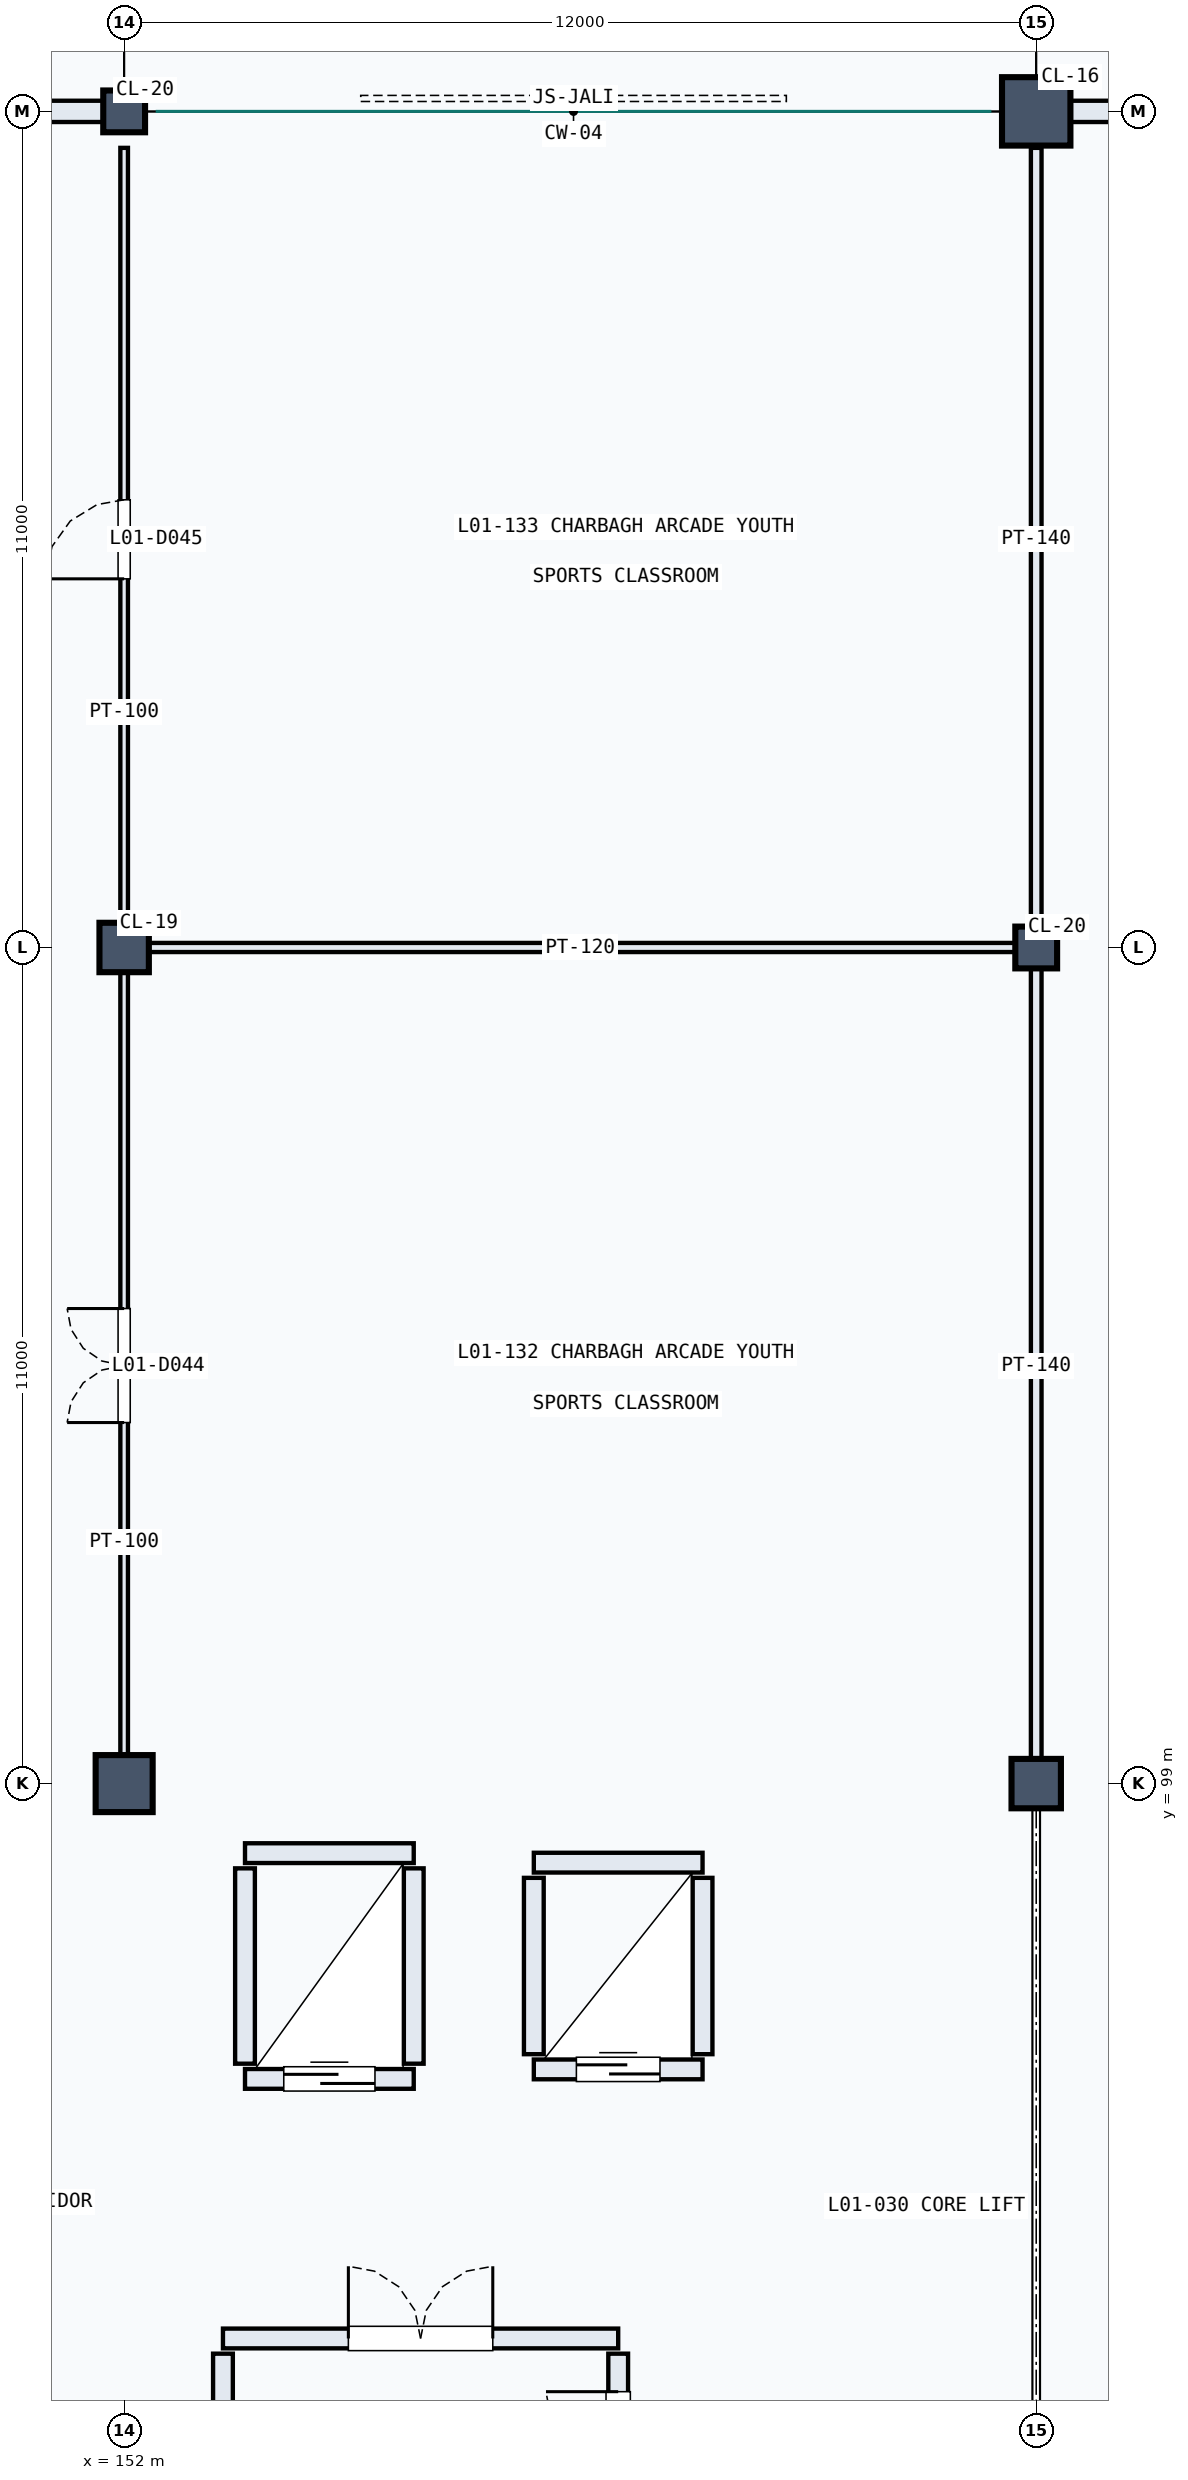
"""IFC4 building model, lengths in metres.
Left out: names, types, materials, properties, quantities, classifications, styles, units other than length and angle.
Written with IfcOpenShell. Run it as: python <this file> out.ifc"""

import sys

from ifc_helpers import new_model, si_unit, direction, frame, frame_2d, origin, origin_2d, place, context, subcontext, project, spatial, rectangle, circle, extrude, element, fill, save


model = new_model("IFC4")
c1 = context("Model", 3, precision=1e-05, world=origin(), true_north=direction((0.0, 1.0)))
c2 = subcontext(c1, "Body", "Model", "MODEL_VIEW")
j1 = project(units=[si_unit("LENGTHUNIT", "METRE"), si_unit("PLANEANGLEUNIT", "RADIAN")], contexts=[c1])
p1 = place(None, origin())
s1 = spatial("IfcSite", under=j1, at=p1, CompositionType="ELEMENT")
p2 = place(p1, origin())
s2 = spatial("IfcBuilding", under=s1, at=p2, CompositionType="ELEMENT")
p3 = place(p2, frame((0.0, 0.0, 5.4)))
s3 = spatial("IfcBuildingStorey", under=s2, at=p3, CompositionType="ELEMENT", Elevation=5.4)
p4 = place(p3, frame((152.0, 99.0, 0.0), z_axis=(0.0, 0.0, 1.0), x_axis=(1.0, 0.0, 0.0)))
e1 = element("IfcColumn", 1, at=p4, inside=s3, PredefinedType="COLUMN", context=c2, shape_type="SweptSolid", body=[
    extrude(circle(Radius=0.375, at=origin_2d()), origin(), (0.0, 0.0, 1.0), 4.8),
])
p5 = place(p3, frame((152.0, 110.0, 0.0), z_axis=(0.0, 0.0, 1.0), x_axis=(1.0, 0.0, 0.0)))
e2 = element("IfcColumn", 2, at=p5, inside=s3, PredefinedType="COLUMN", context=c2, shape_type="SweptSolid", body=[
    extrude(circle(Radius=0.325, at=origin_2d()), origin(), (0.0, 0.0, 1.0), 4.8),
])
p6 = place(p3, frame((152.0, 121.0, 0.0), z_axis=(0.0, 0.0, 1.0), x_axis=(1.0, 0.0, 0.0)))
e3 = element("IfcColumn", 3, at=p6, inside=s3, PredefinedType="COLUMN", context=c2, shape_type="SweptSolid", body=[
    extrude(circle(Radius=0.275, at=origin_2d()), origin(), (0.0, 0.0, 1.0), 4.8),
])
p7 = place(p3, frame((164.0, 99.0, 0.0), z_axis=(0.0, 0.0, 1.0), x_axis=(1.0, 0.0, 0.0)))
e4 = element("IfcColumn", 4, at=p7, inside=s3, PredefinedType="COLUMN", context=c2, shape_type="SweptSolid", body=[
    extrude(circle(Radius=0.325, at=origin_2d()), origin(), (0.0, 0.0, 1.0), 4.8),
])
p8 = place(p3, frame((164.0, 110.0, 0.0), z_axis=(0.0, 0.0, 1.0), x_axis=(1.0, 0.0, 0.0)))
e5 = element("IfcColumn", 5, at=p8, inside=s3, PredefinedType="COLUMN", context=c2, shape_type="SweptSolid", body=[
    extrude(circle(Radius=0.275, at=origin_2d()), origin(), (0.0, 0.0, 1.0), 4.8),
])
p9 = place(p3, frame((164.0, 121.0, 0.0), z_axis=(0.0, 0.0, 1.0), x_axis=(1.0, 0.0, 0.0)))
e6 = element("IfcColumn", 6, at=p9, inside=s3, PredefinedType="COLUMN", context=c2, shape_type="SweptSolid", body=[
    extrude(circle(Radius=0.45, at=origin_2d()), origin(), (0.0, 0.0, 1.0), 4.8),
])
p10 = place(p3, frame((140.22, 121.0, 0.0), z_axis=(0.0, 0.0, 1.0), x_axis=(1.0, 0.0, 0.0)))
e7 = element("IfcWall", 7, at=p10, inside=s3, PredefinedType="SOLIDWALL", context=c2, shape_type="SweptSolid", body=[
    extrude(rectangle(XDim=11.56, YDim=0.28, at=frame_2d((5.78, 0.0))), origin(), (0.0, 0.0, 1.0), 4.465),
])
p11 = place(p10, frame((4.28, 0.0, 0.9)))
e8 = element("IfcOpeningElement", 8, at=p11, cuts=e7, PredefinedType="OPENING", context=c2, shape_type="SweptSolid", body=[
    extrude(rectangle(XDim=3.0, YDim=1.8, at=frame_2d((1.5, 0.9))), frame((0.0, 0.15, 0.0), z_axis=(0.0, -1.0, 0.0), x_axis=(1.0, 0.0, 0.0)), (0.0, 0.0, 1.0), 0.3),
])
p12 = place(p3, frame((164.22, 121.0, 0.0), z_axis=(0.0, 0.0, 1.0), x_axis=(1.0, 0.0, 0.0)))
e9 = element("IfcWall", 9, at=p12, inside=s3, PredefinedType="SOLIDWALL", context=c2, shape_type="SweptSolid", body=[
    extrude(rectangle(XDim=11.56, YDim=0.28, at=frame_2d((5.78, 0.0))), origin(), (0.0, 0.0, 1.0), 3.705),
])
p13 = place(p12, frame((2.853, 0.0, 0.9)))
e10 = element("IfcOpeningElement", 10, at=p13, cuts=e9, PredefinedType="OPENING", context=c2, shape_type="SweptSolid", body=[
    extrude(rectangle(XDim=2.0, YDim=1.65, at=frame_2d((1.0, 0.825))), frame((0.0, 0.15, 0.0), z_axis=(0.0, -1.0, 0.0), x_axis=(1.0, 0.0, 0.0)), (0.0, 0.0, 1.0), 0.3),
])
p14 = place(p12, frame((6.707, 0.0, 0.9)))
e11 = element("IfcOpeningElement", 11, at=p14, cuts=e9, PredefinedType="OPENING", context=c2, shape_type="SweptSolid", body=[
    extrude(rectangle(XDim=2.0, YDim=1.65, at=frame_2d((1.0, 0.825))), frame((0.0, 0.15, 0.0), z_axis=(0.0, -1.0, 0.0), x_axis=(1.0, 0.0, 0.0)), (0.0, 0.0, 1.0), 0.3),
])
p15 = place(p3, frame((153.59, 95.115, 0.0), z_axis=(0.0, 0.0, 1.0), x_axis=(1.0, 0.0, 0.0)))
e12 = element("IfcWall", 12, at=p15, inside=s3, PredefinedType="SOLIDWALL", context=c2, shape_type="SweptSolid", body=[
    extrude(rectangle(XDim=2.22, YDim=0.26, at=frame_2d((1.11, 0.0))), origin(), (0.0, 0.0, 1.0), 4.46),
])
p16 = place(p15, frame((0.51, 0.0, 0.0)))
e13 = element("IfcOpeningElement", 13, at=p16, cuts=e12, PredefinedType="OPENING", context=c2, shape_type="SweptSolid", body=[
    extrude(rectangle(XDim=1.2, YDim=2.2, at=frame_2d((0.6, 1.1))), frame((0.0, 0.14, 0.0), z_axis=(0.0, -1.0, 0.0), x_axis=(1.0, 0.0, 0.0)), (0.0, 0.0, 1.0), 0.28),
])
p17 = place(p3, frame((153.59, 98.085, 0.0), z_axis=(0.0, 0.0, 1.0), x_axis=(1.0, 0.0, 0.0)))
e14 = element("IfcWall", 14, at=p17, inside=s3, PredefinedType="SOLIDWALL", context=c2, shape_type="SweptSolid", body=[
    extrude(rectangle(XDim=2.22, YDim=0.26, at=frame_2d((1.11, 0.0))), origin(), (0.0, 0.0, 1.0), 4.46),
])
for number, where, z_axis, x_axis in (
    (15, (153.59, 95.315, 0.0), (0.0, 0.0, 1.0), (0.0, 1.0, 0.0)),
    (16, (155.81, 95.315, 0.0), (0.0, 0.0, 1.0), (0.0, 1.0, 0.0)),
):
    element("IfcWall", number, at=place(p3, frame(where, z_axis=z_axis, x_axis=x_axis)), inside=s3, PredefinedType="SOLIDWALL", context=c2, shape_type="SweptSolid", body=[
        extrude(rectangle(XDim=2.57, YDim=0.26, at=frame_2d((1.285, 0.0))), origin(), (0.0, 0.0, 1.0), 4.46),
    ])
p18 = place(p3, frame((157.39, 95.24, 0.0), z_axis=(0.0, 0.0, 1.0), x_axis=(1.0, 0.0, 0.0)))
e17 = element("IfcWall", 17, at=p18, inside=s3, PredefinedType="SOLIDWALL", context=c2, shape_type="SweptSolid", body=[
    extrude(rectangle(XDim=2.22, YDim=0.26, at=frame_2d((1.11, 0.0))), origin(), (0.0, 0.0, 1.0), 4.46),
])
p19 = place(p18, frame((0.56, 0.0, 0.0)))
e18 = element("IfcOpeningElement", 18, at=p19, cuts=e17, PredefinedType="OPENING", context=c2, shape_type="SweptSolid", body=[
    extrude(rectangle(XDim=1.1, YDim=2.15, at=frame_2d((0.55, 1.075))), frame((0.0, 0.14, 0.0), z_axis=(0.0, -1.0, 0.0), x_axis=(1.0, 0.0, 0.0)), (0.0, 0.0, 1.0), 0.28),
])
p20 = place(p3, frame((157.39, 97.96, 0.0), z_axis=(0.0, 0.0, 1.0), x_axis=(1.0, 0.0, 0.0)))
e19 = element("IfcWall", 19, at=p20, inside=s3, PredefinedType="SOLIDWALL", context=c2, shape_type="SweptSolid", body=[
    extrude(rectangle(XDim=2.22, YDim=0.26, at=frame_2d((1.11, 0.0))), origin(), (0.0, 0.0, 1.0), 4.46),
])
for number, where, z_axis, x_axis in (
    (20, (157.39, 95.44, 0.0), (0.0, 0.0, 1.0), (0.0, 1.0, 0.0)),
    (21, (159.61, 95.44, 0.0), (0.0, 0.0, 1.0), (0.0, 1.0, 0.0)),
):
    element("IfcWall", number, at=place(p3, frame(where, z_axis=z_axis, x_axis=x_axis)), inside=s3, PredefinedType="SOLIDWALL", context=c2, shape_type="SweptSolid", body=[
        extrude(rectangle(XDim=2.32, YDim=0.26, at=frame_2d((1.16, 0.0))), origin(), (0.0, 0.0, 1.0), 4.46),
    ])
p21 = place(p3, frame((153.3, 91.7, 0.0), z_axis=(0.0, 0.0, 1.0), x_axis=(1.0, 0.0, 0.0)))
e22 = element("IfcWall", 22, at=p21, inside=s3, PredefinedType="SOLIDWALL", context=c2, shape_type="SweptSolid", body=[
    extrude(rectangle(XDim=5.2, YDim=0.26, at=frame_2d((2.6, 0.0))), origin(), (0.0, 0.0, 1.0), 4.46),
])
p22 = place(p21, frame((1.65, 0.0, 0.0)))
e23 = element("IfcOpeningElement", 23, at=p22, cuts=e22, PredefinedType="OPENING", context=c2, shape_type="SweptSolid", body=[
    extrude(rectangle(XDim=1.9, YDim=2.2, at=frame_2d((0.95, 1.1))), frame((0.0, 0.14, 0.0), z_axis=(0.0, -1.0, 0.0), x_axis=(1.0, 0.0, 0.0)), (0.0, 0.0, 1.0), 0.28),
])
p23 = place(p3, frame((153.3, 88.6, 0.0), z_axis=(0.0, 0.0, 1.0), x_axis=(0.0, 1.0, 0.0)))
e24 = element("IfcWall", 24, at=p23, inside=s3, PredefinedType="SOLIDWALL", context=c2, shape_type="SweptSolid", body=[
    extrude(rectangle(XDim=2.9, YDim=0.26, at=frame_2d((1.45, 0.0))), origin(), (0.0, 0.0, 1.0), 4.46),
])
p24 = place(p3, frame((158.5, 88.6, 0.0), z_axis=(0.0, 0.0, 1.0), x_axis=(0.0, 1.0, 0.0)))
e25 = element("IfcWall", 25, at=p24, inside=s3, PredefinedType="SOLIDWALL", context=c2, shape_type="SweptSolid", body=[
    extrude(rectangle(XDim=2.9, YDim=0.26, at=frame_2d((1.45, 0.0))), origin(), (0.0, 0.0, 1.0), 4.46),
])
p25 = place(p24, frame((0.5, 0.0, 0.0)))
e26 = element("IfcOpeningElement", 26, at=p25, cuts=e25, PredefinedType="OPENING", context=c2, shape_type="SweptSolid", body=[
    extrude(rectangle(XDim=1.9, YDim=2.2, at=frame_2d((0.95, 1.1))), frame((0.0, 0.14, 0.0), z_axis=(0.0, -1.0, 0.0), x_axis=(1.0, 0.0, 0.0)), (0.0, 0.0, 1.0), 0.28),
])
p26 = place(p3, frame((152.0, 99.22, 0.0), z_axis=(0.0, 0.0, 1.0), x_axis=(0.0, 1.0, 0.0)))
e27 = element("IfcWall", 27, at=p26, inside=s3, PredefinedType="PARTITIONING", context=c2, shape_type="SweptSolid", body=[
    extrude(rectangle(XDim=10.56, YDim=0.1, at=frame_2d((5.28, 0.0))), origin(), (0.0, 0.0, 1.0), 3.44),
])
p27 = place(p26, frame((4.53, 0.0, 0.0)))
e28 = element("IfcOpeningElement", 28, at=p27, cuts=e27, PredefinedType="OPENING", context=c2, shape_type="SweptSolid", body=[
    extrude(rectangle(XDim=1.5, YDim=2.3, at=frame_2d((0.75, 1.15))), frame((0.0, 0.06, 0.0), z_axis=(0.0, -1.0, 0.0), x_axis=(1.0, 0.0, 0.0)), (0.0, 0.0, 1.0), 0.12),
])
p28 = place(p3, frame((152.0, 110.22, 0.0), z_axis=(0.0, 0.0, 1.0), x_axis=(0.0, 1.0, 0.0)))
e29 = element("IfcWall", 29, at=p28, inside=s3, PredefinedType="PARTITIONING", context=c2, shape_type="SweptSolid", body=[
    extrude(rectangle(XDim=10.3, YDim=0.1, at=frame_2d((5.15, 0.0))), origin(), (0.0, 0.0, 1.0), 4.46),
])
p29 = place(p28, frame((4.63, 0.0, 0.0)))
e30 = element("IfcOpeningElement", 30, at=p29, cuts=e29, PredefinedType="OPENING", context=c2, shape_type="SweptSolid", body=[
    extrude(rectangle(XDim=1.04, YDim=2.15, at=frame_2d((0.52, 1.075))), frame((0.0, 0.06, 0.0), z_axis=(0.0, -1.0, 0.0), x_axis=(1.0, 0.0, 0.0)), (0.0, 0.0, 1.0), 0.12),
])
p30 = place(p3, frame((164.0, 99.22, 0.0), z_axis=(0.0, 0.0, 1.0), x_axis=(0.0, 1.0, 0.0)))
e31 = element("IfcWall", 31, at=p30, inside=s3, PredefinedType="PARTITIONING", context=c2, shape_type="SweptSolid", body=[
    extrude(rectangle(XDim=10.56, YDim=0.14, at=frame_2d((5.28, 0.0))), origin(), (0.0, 0.0, 1.0), 3.69),
])
p31 = place(p3, frame((164.0, 110.22, 0.0), z_axis=(0.0, 0.0, 1.0), x_axis=(0.0, 1.0, 0.0)))
e32 = element("IfcWall", 32, at=p31, inside=s3, PredefinedType="PARTITIONING", context=c2, shape_type="SweptSolid", body=[
    extrude(rectangle(XDim=10.3, YDim=0.14, at=frame_2d((5.15, 0.0))), origin(), (0.0, 0.0, 1.0), 3.705),
])
p32 = place(p3, frame((152.22, 110.0, 0.0), z_axis=(0.0, 0.0, 1.0), x_axis=(1.0, 0.0, 0.0)))
e33 = element("IfcWall", 33, at=p32, inside=s3, PredefinedType="PARTITIONING", context=c2, shape_type="SweptSolid", body=[
    extrude(rectangle(XDim=11.56, YDim=0.12, at=frame_2d((5.78, 0.0))), origin(), (0.0, 0.0, 1.0), 3.705),
])
p33 = place(p16, origin())
e34 = element("IfcDoor", 34, at=p33, inside=s3, OperationType="SLIDING_TO_LEFT", PredefinedType="DOOR", context=c2, shape_type="SweptSolid", body=[
    extrude(rectangle(XDim=1.2, YDim=2.2, at=frame_2d((0.6, 1.1))), frame((0.0, 0.025, 0.0), z_axis=(0.0, -1.0, 0.0), x_axis=(1.0, 0.0, 0.0)), (0.0, 0.0, 1.0), 0.05),
])
fill(e13, e34)
p34 = place(p19, origin())
e35 = element("IfcDoor", 35, at=p34, inside=s3, OperationType="SLIDING_TO_LEFT", PredefinedType="DOOR", context=c2, shape_type="SweptSolid", body=[
    extrude(rectangle(XDim=1.1, YDim=2.15, at=frame_2d((0.55, 1.075))), frame((0.0, 0.025, 0.0), z_axis=(0.0, -1.0, 0.0), x_axis=(1.0, 0.0, 0.0)), (0.0, 0.0, 1.0), 0.05),
])
fill(e18, e35)
p35 = place(p22, origin())
e36 = element("IfcDoor", 36, at=p35, inside=s3, OperationType="DOUBLE_DOOR_SINGLE_SWING", PredefinedType="DOOR", context=c2, shape_type="SweptSolid", body=[
    extrude(rectangle(XDim=1.9, YDim=2.2, at=frame_2d((0.95, 1.1))), frame((0.0, 0.025, 0.0), z_axis=(0.0, -1.0, 0.0), x_axis=(1.0, 0.0, 0.0)), (0.0, 0.0, 1.0), 0.05),
])
fill(e23, e36)
p36 = place(p25, origin())
e37 = element("IfcDoor", 37, at=p36, inside=s3, OperationType="DOUBLE_DOOR_SINGLE_SWING", PredefinedType="DOOR", context=c2, shape_type="SweptSolid", body=[
    extrude(rectangle(XDim=1.9, YDim=2.2, at=frame_2d((0.95, 1.1))), frame((0.0, 0.025, 0.0), z_axis=(0.0, -1.0, 0.0), x_axis=(1.0, 0.0, 0.0)), (0.0, 0.0, 1.0), 0.05),
])
fill(e26, e37)
p37 = place(p27, origin())
e38 = element("IfcDoor", 38, at=p37, inside=s3, OperationType="DOUBLE_DOOR_SINGLE_SWING", PredefinedType="DOOR", context=c2, shape_type="SweptSolid", body=[
    extrude(rectangle(XDim=1.5, YDim=2.3, at=frame_2d((0.75, 1.15))), frame((0.0, 0.025, 0.0), z_axis=(0.0, -1.0, 0.0), x_axis=(1.0, 0.0, 0.0)), (0.0, 0.0, 1.0), 0.05),
])
fill(e28, e38)
p38 = place(p29, origin())
e39 = element("IfcDoor", 39, at=p38, inside=s3, OperationType="SINGLE_SWING_LEFT", PredefinedType="DOOR", context=c2, shape_type="SweptSolid", body=[
    extrude(rectangle(XDim=1.04, YDim=2.15, at=frame_2d((0.52, 1.075))), frame((0.0, 0.025, 0.0), z_axis=(0.0, -1.0, 0.0), x_axis=(1.0, 0.0, 0.0)), (0.0, 0.0, 1.0), 0.05),
])
fill(e30, e39)
save(model, sys.argv[1])
